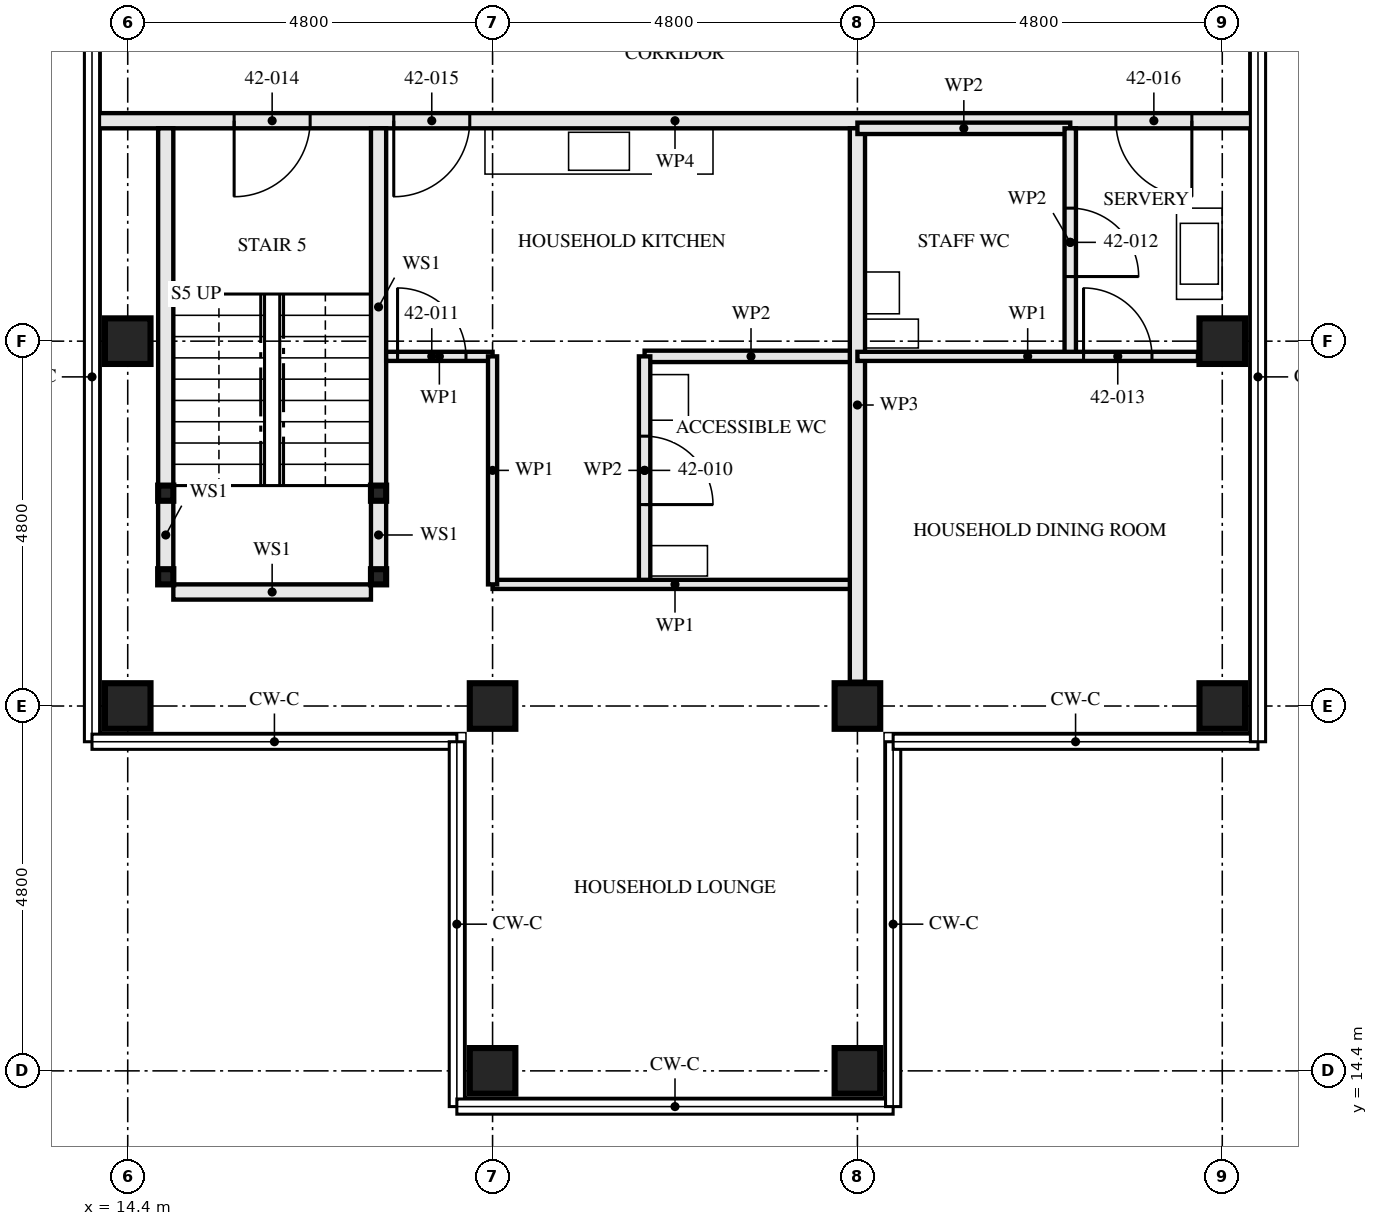
"""IFC4 building model, lengths in metres.
Left out: names, types, materials, properties, quantities, classifications, styles, units other than length and angle.
Written with IfcOpenShell. Run it as: python <this file> out.ifc"""

import sys

from ifc_helpers import new_model, si_unit, direction, frame, frame_2d, origin, origin_2d, place, context, subcontext, project, spatial, rectangle, hollow_rectangle, extrude, element, fill, save


model = new_model("IFC4")
c1 = context("Model", 3, precision=1e-05, world=origin(), true_north=direction((0.0, 1.0)))
c2 = subcontext(c1, "Body", "Model", "MODEL_VIEW")
j1 = project(units=[si_unit("LENGTHUNIT", "METRE"), si_unit("PLANEANGLEUNIT", "RADIAN")], contexts=[c1])
p1 = place(None, origin())
s1 = spatial("IfcSite", under=j1, at=p1, CompositionType="ELEMENT")
p2 = place(p1, origin())
s2 = spatial("IfcBuilding", under=s1, at=p2, CompositionType="ELEMENT")
p3 = place(p2, frame((0.0, 0.0, 155.0)))
s3 = spatial("IfcBuildingStorey", under=s2, at=p3, CompositionType="ELEMENT", Elevation=155.0)
p4 = place(p3, frame((14.4, 19.2, 0.0), z_axis=(0.0, 0.0, 1.0), x_axis=(0.0, 1.0, 0.0)))
e1 = element("IfcColumn", 1, at=p4, inside=s3, PredefinedType="COLUMN", context=c2, shape_type="SweptSolid", body=[
    extrude(hollow_rectangle(XDim=0.6, YDim=0.6, WallThickness=0.06, at=origin_2d()), origin(), (0.0, 0.0, 1.0), 3.5),
])
p5 = place(p3, frame((14.4, 24.0, 0.0), z_axis=(0.0, 0.0, 1.0), x_axis=(1.0, 0.0, 0.0)))
e2 = element("IfcColumn", 2, at=p5, inside=s3, PredefinedType="COLUMN", context=c2, shape_type="SweptSolid", body=[
    extrude(hollow_rectangle(XDim=0.6, YDim=0.6, WallThickness=0.08, at=origin_2d()), origin(), (0.0, 0.0, 1.0), 3.5),
])
for number, where, z_axis, x_axis in (
    (3, (19.2, 14.4, 0.0), (0.0, 0.0, 1.0), (0.0, 1.0, 0.0)),
    (4, (19.2, 19.2, 0.0), (0.0, 0.0, 1.0), (0.0, 1.0, 0.0)),
    (5, (24.0, 14.4, 0.0), (0.0, 0.0, 1.0), (0.0, 1.0, 0.0)),
    (6, (24.0, 19.2, 0.0), (0.0, 0.0, 1.0), (0.0, 1.0, 0.0)),
    (7, (28.8, 19.2, 0.0), (0.0, 0.0, 1.0), (0.0, 1.0, 0.0)),
):
    element("IfcColumn", number, at=place(p3, frame(where, z_axis=z_axis, x_axis=x_axis)), inside=s3, PredefinedType="COLUMN", context=c2, shape_type="SweptSolid", body=[
        extrude(hollow_rectangle(XDim=0.6, YDim=0.6, WallThickness=0.06, at=origin_2d()), origin(), (0.0, 0.0, 1.0), 3.5),
    ])
p6 = place(p3, frame((28.8, 24.0, 0.0), z_axis=(0.0, 0.0, 1.0), x_axis=(1.0, 0.0, 0.0)))
e8 = element("IfcColumn", 8, at=p6, inside=s3, PredefinedType="COLUMN", context=c2, shape_type="SweptSolid", body=[
    extrude(hollow_rectangle(XDim=0.6, YDim=0.6, WallThickness=0.08, at=origin_2d()), origin(), (0.0, 0.0, 1.0), 3.5),
])
for number, where, z_axis, x_axis in (
    (9, (14.9, 20.9, 0.0), (0.0, 0.0, 1.0), (1.0, 0.0, 0.0)),
    (10, (17.7, 20.9, 0.0), (0.0, 0.0, 1.0), (1.0, 0.0, 0.0)),
    (11, (14.9, 22.0, 0.0), (0.0, 0.0, 1.0), (1.0, 0.0, 0.0)),
    (12, (17.7, 22.0, 0.0), (0.0, 0.0, 1.0), (1.0, 0.0, 0.0)),
):
    element("IfcColumn", number, at=place(p3, frame(where, z_axis=z_axis, x_axis=x_axis)), inside=s3, PredefinedType="COLUMN", context=c2, shape_type="SweptSolid", body=[
        extrude(hollow_rectangle(XDim=0.2, YDim=0.2, WallThickness=0.008, at=origin_2d()), origin(), (0.0, 0.0, 1.0), 3.33),
    ])
p7 = place(p3, frame((14.9, 21.0, 0.0), z_axis=(0.0, 0.0, 1.0), x_axis=(0.0, 1.0, 0.0)))
e13 = element("IfcWall", 13, at=p7, inside=s3, PredefinedType="SOLIDWALL", context=c2, shape_type="SweptSolid", body=[
    extrude(rectangle(XDim=0.9, YDim=0.2, at=frame_2d((0.45, 0.0))), origin(), (0.0, 0.0, 1.0), 2.99),
])
p8 = place(p3, frame((14.9, 22.1, 0.0), z_axis=(0.0, 0.0, 1.0), x_axis=(0.0, 1.0, 0.0)))
e14 = element("IfcWall", 14, at=p8, inside=s3, PredefinedType="SOLIDWALL", context=c2, shape_type="SweptSolid", body=[
    extrude(rectangle(XDim=4.7, YDim=0.2, at=frame_2d((2.35, 0.0))), origin(), (0.0, 0.0, 1.0), 2.99),
])
p9 = place(p3, frame((17.7, 21.0, 0.0), z_axis=(0.0, 0.0, 1.0), x_axis=(0.0, 1.0, 0.0)))
e15 = element("IfcWall", 15, at=p9, inside=s3, PredefinedType="SOLIDWALL", context=c2, shape_type="SweptSolid", body=[
    extrude(rectangle(XDim=0.9, YDim=0.2, at=frame_2d((0.45, 0.0))), origin(), (0.0, 0.0, 1.0), 2.99),
])
p10 = place(p3, frame((17.7, 22.1, 0.0), z_axis=(0.0, 0.0, 1.0), x_axis=(0.0, 1.0, 0.0)))
e16 = element("IfcWall", 16, at=p10, inside=s3, PredefinedType="SOLIDWALL", context=c2, shape_type="SweptSolid", body=[
    extrude(rectangle(XDim=4.7, YDim=0.2, at=frame_2d((2.35, 0.0))), origin(), (0.0, 0.0, 1.0), 2.99),
])
p11 = place(p3, frame((15.0, 20.7, 0.0), z_axis=(0.0, 0.0, 1.0), x_axis=(1.0, 0.0, 0.0)))
e17 = element("IfcWall", 17, at=p11, inside=s3, PredefinedType="SOLIDWALL", context=c2, shape_type="SweptSolid", body=[
    extrude(rectangle(XDim=2.6, YDim=0.2, at=frame_2d((1.3, 0.0))), origin(), (0.0, 0.0, 1.0), 3.33),
])
p12 = place(p3, frame((21.2, 20.8, 0.0), z_axis=(0.0, 0.0, 1.0), x_axis=(0.0, 1.0, 0.0)))
e18 = element("IfcWall", 18, at=p12, inside=s3, PredefinedType="PARTITIONING", context=c2, shape_type="SweptSolid", body=[
    extrude(rectangle(XDim=3.0, YDim=0.15, at=frame_2d((1.5, 0.0))), origin(), (0.0, 0.0, 1.0), 3.33),
])
p13 = place(p12, frame((1.05, 0.0, 0.0)))
e19 = element("IfcOpeningElement", 19, at=p13, cuts=e18, PredefinedType="OPENING", context=c2, shape_type="SweptSolid", body=[
    extrude(rectangle(XDim=0.9, YDim=2.1, at=frame_2d((0.45, 1.05))), frame((0.0, 0.085, 0.0), z_axis=(0.0, -1.0, 0.0), x_axis=(1.0, 0.0, 0.0)), (0.0, 0.0, 1.0), 0.171),
])
p14 = place(p3, frame((21.2, 23.8, 0.0), z_axis=(0.0, 0.0, 1.0), x_axis=(1.0, 0.0, 0.0)))
e20 = element("IfcWall", 20, at=p14, inside=s3, PredefinedType="PARTITIONING", context=c2, shape_type="SweptSolid", body=[
    extrude(rectangle(XDim=2.8, YDim=0.15, at=frame_2d((1.4, 0.0))), origin(), (0.0, 0.0, 1.0), 3.33),
])
p15 = place(p3, frame((17.8, 23.8, 0.0), z_axis=(0.0, 0.0, 1.0), x_axis=(1.0, 0.0, 0.0)))
e21 = element("IfcWall", 21, at=p15, inside=s3, PredefinedType="PARTITIONING", context=c2, shape_type="SweptSolid", body=[
    extrude(rectangle(XDim=1.4, YDim=0.12, at=frame_2d((0.7, 0.0))), origin(), (0.0, 0.0, 1.0), 3.33),
])
p16 = place(p15, frame((0.15, 0.0, 0.0)))
e22 = element("IfcOpeningElement", 22, at=p16, cuts=e21, PredefinedType="OPENING", context=c2, shape_type="SweptSolid", body=[
    extrude(rectangle(XDim=0.9, YDim=2.1, at=frame_2d((0.45, 1.05))), frame((0.0, 0.071, 0.0), z_axis=(0.0, -1.0, 0.0), x_axis=(1.0, 0.0, 0.0)), (0.0, 0.0, 1.0), 0.141),
])
p17 = place(p3, frame((19.2, 20.8, 0.0), z_axis=(0.0, 0.0, 1.0), x_axis=(1.0, 0.0, 0.0)))
e23 = element("IfcWall", 23, at=p17, inside=s3, PredefinedType="PARTITIONING", context=c2, shape_type="SweptSolid", body=[
    extrude(rectangle(XDim=4.8, YDim=0.12, at=frame_2d((2.4, 0.0))), origin(), (0.0, 0.0, 1.0), 3.33),
])
p18 = place(p3, frame((19.2, 20.8, 0.0), z_axis=(0.0, 0.0, 1.0), x_axis=(0.0, 1.0, 0.0)))
e24 = element("IfcWall", 24, at=p18, inside=s3, PredefinedType="PARTITIONING", context=c2, shape_type="SweptSolid", body=[
    extrude(rectangle(XDim=3.0, YDim=0.12, at=frame_2d((1.5, 0.0))), origin(), (0.0, 0.0, 1.0), 2.55),
])
p19 = place(p3, frame((24.0, 19.52, 0.0), z_axis=(0.0, 0.0, 1.0), x_axis=(0.0, 1.0, 0.0)))
e25 = element("IfcWall", 25, at=p19, inside=s3, PredefinedType="PARTITIONING", context=c2, shape_type="SweptSolid", body=[
    extrude(rectangle(XDim=7.28, YDim=0.2, at=frame_2d((3.64, 0.0))), origin(), (0.0, 0.0, 1.0), 2.55),
])
p20 = place(p3, frame((26.8, 23.8, 0.0), z_axis=(0.0, 0.0, 1.0), x_axis=(0.0, 1.0, 0.0)))
e26 = element("IfcWall", 26, at=p20, inside=s3, PredefinedType="PARTITIONING", context=c2, shape_type="SweptSolid", body=[
    extrude(rectangle(XDim=3.0, YDim=0.15, at=frame_2d((1.5, 0.0))), origin(), (0.0, 0.0, 1.0), 2.55),
])
p21 = place(p20, frame((1.05, 0.0, 0.0)))
e27 = element("IfcOpeningElement", 27, at=p21, cuts=e26, PredefinedType="OPENING", context=c2, shape_type="SweptSolid", body=[
    extrude(rectangle(XDim=0.9, YDim=2.1, at=frame_2d((0.45, 1.05))), frame((0.0, 0.085, 0.0), z_axis=(0.0, -1.0, 0.0), x_axis=(1.0, 0.0, 0.0)), (0.0, 0.0, 1.0), 0.171),
])
p22 = place(p3, frame((24.0, 26.8, 0.0), z_axis=(0.0, 0.0, 1.0), x_axis=(1.0, 0.0, 0.0)))
e28 = element("IfcWall", 28, at=p22, inside=s3, PredefinedType="PARTITIONING", context=c2, shape_type="SweptSolid", body=[
    extrude(rectangle(XDim=2.8, YDim=0.15, at=frame_2d((1.4, 0.0))), origin(), (0.0, 0.0, 1.0), 3.33),
])
p23 = place(p3, frame((24.0, 23.8, 0.0), z_axis=(0.0, 0.0, 1.0), x_axis=(1.0, 0.0, 0.0)))
e29 = element("IfcWall", 29, at=p23, inside=s3, PredefinedType="PARTITIONING", context=c2, shape_type="SweptSolid", body=[
    extrude(rectangle(XDim=4.48, YDim=0.12, at=frame_2d((2.24, 0.0))), origin(), (0.0, 0.0, 1.0), 3.33),
])
p24 = place(p23, frame((2.975, 0.0, 0.0)))
e30 = element("IfcOpeningElement", 30, at=p24, cuts=e29, PredefinedType="OPENING", context=c2, shape_type="SweptSolid", body=[
    extrude(rectangle(XDim=0.9, YDim=2.1, at=frame_2d((0.45, 1.05))), frame((0.0, 0.071, 0.0), z_axis=(0.0, -1.0, 0.0), x_axis=(1.0, 0.0, 0.0)), (0.0, 0.0, 1.0), 0.141),
])
p25 = place(p3, frame((13.95, 26.9, 0.0), z_axis=(0.0, 0.0, 1.0), x_axis=(1.0, 0.0, 0.0)))
e31 = element("IfcWall", 31, at=p25, inside=s3, PredefinedType="PARTITIONING", context=c2, shape_type="SweptSolid", body=[
    extrude(rectangle(XDim=15.3, YDim=0.2, at=frame_2d((7.65, 0.0))), origin(), (0.0, 0.0, 1.0), 2.32),
])
p26 = place(p25, frame((1.85, 0.0, 0.0)))
e32 = element("IfcOpeningElement", 32, at=p26, cuts=e31, PredefinedType="OPENING", context=c2, shape_type="SweptSolid", body=[
    extrude(rectangle(XDim=1.0, YDim=2.1, at=frame_2d((0.5, 1.05))), frame((0.0, 0.111, 0.0), z_axis=(0.0, -1.0, 0.0), x_axis=(1.0, 0.0, 0.0)), (0.0, 0.0, 1.0), 0.221),
])
p27 = place(p25, frame((3.95, 0.0, 0.0)))
e33 = element("IfcOpeningElement", 33, at=p27, cuts=e31, PredefinedType="OPENING", context=c2, shape_type="SweptSolid", body=[
    extrude(rectangle(XDim=1.0, YDim=2.1, at=frame_2d((0.5, 1.05))), frame((0.0, 0.111, 0.0), z_axis=(0.0, -1.0, 0.0), x_axis=(1.0, 0.0, 0.0)), (0.0, 0.0, 1.0), 0.221),
])
p28 = place(p25, frame((13.45, 0.0, 0.0)))
e34 = element("IfcOpeningElement", 34, at=p28, cuts=e31, PredefinedType="OPENING", context=c2, shape_type="SweptSolid", body=[
    extrude(rectangle(XDim=1.0, YDim=2.1, at=frame_2d((0.5, 1.05))), frame((0.0, 0.111, 0.0), z_axis=(0.0, -1.0, 0.0), x_axis=(1.0, 0.0, 0.0)), (0.0, 0.0, 1.0), 0.221),
])
p29 = place(p13, frame((0.9, 0.0, 0.0), z_axis=(0.0, 0.0, 1.0), x_axis=(-1.0, 0.0, 0.0)))
e35 = element("IfcDoor", 35, at=p29, inside=s3, OperationType="SINGLE_SWING_LEFT", PredefinedType="DOOR", context=c2, shape_type="SweptSolid", body=[
    extrude(rectangle(XDim=0.9, YDim=2.1, at=frame_2d((0.45, 1.05))), frame((0.0, 0.022, 0.0), z_axis=(0.0, -1.0, 0.0), x_axis=(1.0, 0.0, 0.0)), (0.0, 0.0, 1.0), 0.044),
])
fill(e19, e35)
p30 = place(p16, origin())
e36 = element("IfcDoor", 36, at=p30, inside=s3, OperationType="SINGLE_SWING_RIGHT", PredefinedType="DOOR", context=c2, shape_type="SweptSolid", body=[
    extrude(rectangle(XDim=0.9, YDim=2.1, at=frame_2d((0.45, 1.05))), frame((0.0, 0.022, 0.0), z_axis=(0.0, -1.0, 0.0), x_axis=(1.0, 0.0, 0.0)), (0.0, 0.0, 1.0), 0.044),
])
fill(e22, e36)
p31 = place(p21, frame((0.9, 0.0, 0.0), z_axis=(0.0, 0.0, 1.0), x_axis=(-1.0, 0.0, 0.0)))
e37 = element("IfcDoor", 37, at=p31, inside=s3, OperationType="SINGLE_SWING_LEFT", PredefinedType="DOOR", context=c2, shape_type="SweptSolid", body=[
    extrude(rectangle(XDim=0.9, YDim=2.1, at=frame_2d((0.45, 1.05))), frame((0.0, 0.022, 0.0), z_axis=(0.0, -1.0, 0.0), x_axis=(1.0, 0.0, 0.0)), (0.0, 0.0, 1.0), 0.044),
])
fill(e27, e37)
p32 = place(p24, origin())
e38 = element("IfcDoor", 38, at=p32, inside=s3, OperationType="SINGLE_SWING_RIGHT", PredefinedType="DOOR", context=c2, shape_type="SweptSolid", body=[
    extrude(rectangle(XDim=0.9, YDim=2.1, at=frame_2d((0.45, 1.05))), frame((0.0, 0.022, 0.0), z_axis=(0.0, -1.0, 0.0), x_axis=(1.0, 0.0, 0.0)), (0.0, 0.0, 1.0), 0.044),
])
fill(e30, e38)
p33 = place(p26, frame((1.0, 0.0, 0.0), z_axis=(0.0, 0.0, 1.0), x_axis=(-1.0, 0.0, 0.0)))
e39 = element("IfcDoor", 39, at=p33, inside=s3, OperationType="SINGLE_SWING_LEFT", PredefinedType="DOOR", context=c2, shape_type="SweptSolid", body=[
    extrude(rectangle(XDim=1.0, YDim=2.1, at=frame_2d((0.5, 1.05))), frame((0.0, 0.032, 0.0), z_axis=(0.0, -1.0, 0.0), x_axis=(1.0, 0.0, 0.0)), (0.0, 0.0, 1.0), 0.064),
])
fill(e32, e39)
p34 = place(p27, frame((1.0, 0.0, 0.0), z_axis=(0.0, 0.0, 1.0), x_axis=(-1.0, 0.0, 0.0)))
e40 = element("IfcDoor", 40, at=p34, inside=s3, OperationType="SINGLE_SWING_LEFT", PredefinedType="DOOR", context=c2, shape_type="SweptSolid", body=[
    extrude(rectangle(XDim=1.0, YDim=2.1, at=frame_2d((0.5, 1.05))), frame((0.0, 0.027, 0.0), z_axis=(0.0, -1.0, 0.0), x_axis=(1.0, 0.0, 0.0)), (0.0, 0.0, 1.0), 0.054),
])
fill(e33, e40)
p35 = place(p28, frame((1.0, 0.0, 0.0), z_axis=(0.0, 0.0, 1.0), x_axis=(-1.0, 0.0, 0.0)))
e41 = element("IfcDoor", 41, at=p35, inside=s3, OperationType="SINGLE_SWING_RIGHT", PredefinedType="DOOR", context=c2, shape_type="SweptSolid", body=[
    extrude(rectangle(XDim=1.0, YDim=2.1, at=frame_2d((0.5, 1.05))), frame((0.0, 0.027, 0.0), z_axis=(0.0, -1.0, 0.0), x_axis=(1.0, 0.0, 0.0)), (0.0, 0.0, 1.0), 0.054),
])
fill(e34, e41)
save(model, sys.argv[1])
